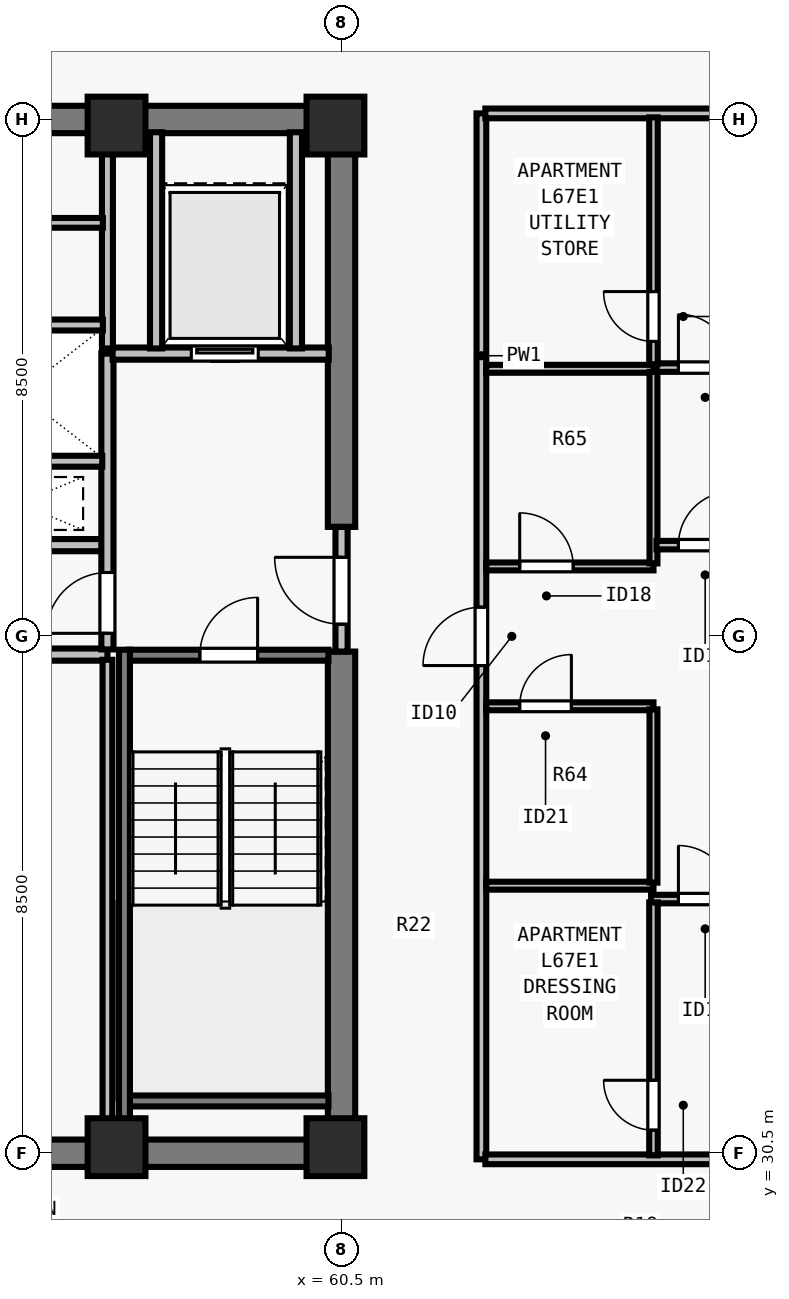
"""IFC4 building model, lengths in metres.
Left out: names, types, materials, properties, quantities, classifications, styles, units other than length and angle.
Written with IfcOpenShell. Run it as: python <this file> out.ifc"""

import sys

from ifc_helpers import new_model, si_unit, direction, frame, frame_2d, origin, origin_2d, place, context, subcontext, project, spatial, rectangle, extrude, element, fill, save


model = new_model("IFC4")
c1 = context("Model", 3, precision=1e-05, world=origin(), true_north=direction((0.0, 1.0)))
c2 = subcontext(c1, "Body", "Model", "MODEL_VIEW")
j1 = project(units=[si_unit("LENGTHUNIT", "METRE"), si_unit("PLANEANGLEUNIT", "RADIAN")], contexts=[c1])
p1 = place(None, origin())
s1 = spatial("IfcSite", under=j1, at=p1, CompositionType="ELEMENT")
p2 = place(p1, origin())
s2 = spatial("IfcBuilding", under=s1, at=p2, CompositionType="ELEMENT")
p3 = place(p2, frame((0.0, 0.0, 244.5)))
s3 = spatial("IfcBuildingStorey", under=s2, at=p3, CompositionType="ELEMENT", Elevation=244.5)
for number, where, z_axis, x_axis in (
    (1, (56.8, 30.6, 0.0), (0.0, 0.0, 1.0), (1.0, 0.0, 0.0)),
    (2, (60.4, 30.6, 0.0), (0.0, 0.0, 1.0), (1.0, 0.0, 0.0)),
    (3, (56.8, 47.4, 0.0), (0.0, 0.0, 1.0), (1.0, 0.0, 0.0)),
    (4, (60.4, 47.4, 0.0), (0.0, 0.0, 1.0), (1.0, 0.0, 0.0)),
):
    element("IfcColumn", number, at=place(p3, frame(where, z_axis=z_axis, x_axis=x_axis)), inside=s3, PredefinedType="COLUMN", context=c2, shape_type="SweptSolid", body=[
        extrude(rectangle(XDim=0.95, YDim=0.95, at=origin_2d()), origin(), (0.0, 0.0, 1.0), 3.5),
    ])
for number, where, z_axis, x_axis in (
    (5, (43.275, 30.5, 0.0), (0.0, 0.0, 1.0), (1.0, 0.0, 0.0)),
    (6, (43.275, 47.5, 0.0), (0.0, 0.0, 1.0), (1.0, 0.0, 0.0)),
):
    element("IfcWall", number, at=place(p3, frame(where, z_axis=z_axis, x_axis=x_axis)), inside=s3, PredefinedType="SHEAR", context=c2, shape_type="SweptSolid", body=[
        extrude(rectangle(XDim=17.45, YDim=0.45, at=frame_2d((8.725, 0.0))), origin(), (0.0, 0.0, 1.0), 3.29),
    ])
p4 = place(p3, frame((60.5, 30.715, 0.0), z_axis=(0.0, 0.0, 1.0), x_axis=(0.0, 1.0, 0.0)))
e7 = element("IfcWall", 7, at=p4, inside=s3, PredefinedType="SHEAR", context=c2, shape_type="SweptSolid", body=[
    extrude(rectangle(XDim=8.035, YDim=0.45, at=frame_2d((4.018, 0.0))), origin(), (0.0, 0.0, 1.0), 3.29),
])
p5 = place(p3, frame((60.5, 40.8, 0.0), z_axis=(0.0, 0.0, 1.0), x_axis=(0.0, 1.0, 0.0)))
e8 = element("IfcWall", 8, at=p5, inside=s3, PredefinedType="SHEAR", context=c2, shape_type="SweptSolid", body=[
    extrude(rectangle(XDim=6.485, YDim=0.45, at=frame_2d((3.242, 0.0))), origin(), (0.0, 0.0, 1.0), 3.29),
])
for number, where, z_axis, x_axis in (
    (9, (53.7, 38.7, 0.0), (0.0, 0.0, 1.0), (1.0, 0.0, 0.0)),
    (10, (53.7, 40.5, 0.0), (0.0, 0.0, 1.0), (1.0, 0.0, 0.0)),
):
    element("IfcWall", number, at=place(p3, frame(where, z_axis=z_axis, x_axis=x_axis)), inside=s3, PredefinedType="SOLIDWALL", context=c2, shape_type="SweptSolid", body=[
        extrude(rectangle(XDim=2.95, YDim=0.2, at=frame_2d((1.475, 0.0))), origin(), (0.0, 0.0, 1.0), 3.29),
    ])
p6 = place(p3, frame((60.5, 38.75, 0.0), z_axis=(0.0, 0.0, 1.0), x_axis=(0.0, 1.0, 0.0)))
e11 = element("IfcWall", 11, at=p6, inside=s3, PredefinedType="SOLIDWALL", context=c2, shape_type="SweptSolid", body=[
    extrude(rectangle(XDim=2.05, YDim=0.2, at=frame_2d((1.025, 0.0))), origin(), (0.0, 0.0, 1.0), 3.29),
])
p7 = place(p6, frame((0.45, 0.0, 0.0)))
e12 = element("IfcOpeningElement", 12, at=p7, cuts=e11, PredefinedType="OPENING", context=c2, shape_type="SweptSolid", body=[
    extrude(rectangle(XDim=1.1, YDim=2.15, at=frame_2d((0.55, 1.075))), frame((0.0, 0.11, 0.0), z_axis=(0.0, -1.0, 0.0), x_axis=(1.0, 0.0, 0.0)), (0.0, 0.0, 1.0), 0.22),
])
p8 = place(p3, frame((56.65, 38.785, 0.0), z_axis=(0.0, 0.0, 1.0), x_axis=(0.0, 1.0, 0.0)))
e13 = element("IfcWall", 13, at=p8, inside=s3, PredefinedType="SOLIDWALL", context=c2, shape_type="SweptSolid", body=[
    extrude(rectangle(XDim=4.865, YDim=0.2, at=frame_2d((2.433, 0.0))), origin(), (0.0, 0.0, 1.0), 3.29),
])
p9 = place(p8, frame((0.265, 0.0, 0.0)))
e14 = element("IfcOpeningElement", 14, at=p9, cuts=e13, PredefinedType="OPENING", context=c2, shape_type="SweptSolid", body=[
    extrude(rectangle(XDim=1.0, YDim=2.15, at=frame_2d((0.5, 1.075))), frame((0.0, 0.11, 0.0), z_axis=(0.0, -1.0, 0.0), x_axis=(1.0, 0.0, 0.0)), (0.0, 0.0, 1.0), 0.22),
])
p10 = place(p3, frame((56.735, 43.65, 0.0), z_axis=(0.0, 0.0, 1.0), x_axis=(1.0, 0.0, 0.0)))
e15 = element("IfcWall", 15, at=p10, inside=s3, PredefinedType="SOLIDWALL", context=c2, shape_type="SweptSolid", body=[
    extrude(rectangle(XDim=3.555, YDim=0.2, at=frame_2d((1.777, 0.0))), origin(), (0.0, 0.0, 1.0), 3.29),
])
p11 = place(p10, frame((1.295, 0.0, 0.0)))
e16 = element("IfcOpeningElement", 16, at=p11, cuts=e15, PredefinedType="OPENING", context=c2, shape_type="SweptSolid", body=[
    extrude(rectangle(XDim=1.1, YDim=2.2, at=frame_2d((0.55, 1.1))), frame((0.0, 0.11, 0.0), z_axis=(0.0, -1.0, 0.0), x_axis=(1.0, 0.0, 0.0)), (0.0, 0.0, 1.0), 0.22),
])
for number, where, z_axis, x_axis in (
    (17, (57.45, 43.735, 0.0), (0.0, 0.0, 1.0), (0.0, 1.0, 0.0)),
    (18, (59.75, 43.735, 0.0), (0.0, 0.0, 1.0), (0.0, 1.0, 0.0)),
):
    element("IfcWall", number, at=place(p3, frame(where, z_axis=z_axis, x_axis=x_axis)), inside=s3, PredefinedType="SOLIDWALL", context=c2, shape_type="SweptSolid", body=[
        extrude(rectangle(XDim=3.555, YDim=0.2, at=frame_2d((1.777, 0.0))), origin(), (0.0, 0.0, 1.0), 3.29),
    ])
p12 = place(p3, frame((56.65, 30.71, 0.0), z_axis=(0.0, 0.0, 1.0), x_axis=(0.0, 1.0, 0.0)))
e19 = element("IfcWall", 19, at=p12, inside=s3, PredefinedType="PARTITIONING", context=c2, shape_type="SweptSolid", body=[
    extrude(rectangle(XDim=7.905, YDim=0.16, at=frame_2d((3.953, 0.0))), origin(), (0.0, 0.0, 1.0), 3.29),
])
p13 = place(p3, frame((56.65, 43.735, 0.0), z_axis=(0.0, 0.0, 1.0), x_axis=(0.0, 1.0, 0.0)))
e20 = element("IfcWall", 20, at=p13, inside=s3, PredefinedType="SOLIDWALL", context=c2, shape_type="SweptSolid", body=[
    extrude(rectangle(XDim=3.555, YDim=0.18, at=frame_2d((1.777, 0.0))), origin(), (0.0, 0.0, 1.0), 3.29),
])
p14 = place(p3, frame((53.785, 41.88, 0.0), z_axis=(0.0, 0.0, 1.0), x_axis=(1.0, 0.0, 0.0)))
e21 = element("IfcWall", 21, at=p14, inside=s3, PredefinedType="SOLIDWALL", context=c2, shape_type="SweptSolid", body=[
    extrude(rectangle(XDim=2.78, YDim=0.18, at=frame_2d((1.39, 0.0))), origin(), (0.0, 0.0, 1.0), 3.29),
])
p15 = place(p3, frame((53.785, 44.12, 0.0), z_axis=(0.0, 0.0, 1.0), x_axis=(1.0, 0.0, 0.0)))
e22 = element("IfcWall", 22, at=p15, inside=s3, PredefinedType="SOLIDWALL", context=c2, shape_type="SweptSolid", body=[
    extrude(rectangle(XDim=2.79, YDim=0.18, at=frame_2d((1.395, 0.0))), origin(), (0.0, 0.0, 1.0), 3.29),
])
p16 = place(p3, frame((53.785, 45.8, 0.0), z_axis=(0.0, 0.0, 1.0), x_axis=(1.0, 0.0, 0.0)))
e23 = element("IfcWall", 23, at=p16, inside=s3, PredefinedType="PARTITIONING", context=c2, shape_type="SweptSolid", body=[
    extrude(rectangle(XDim=2.79, YDim=0.16, at=frame_2d((1.395, 0.0))), origin(), (0.0, 0.0, 1.0), 3.29),
])
p17 = place(p3, frame((62.8, 30.4, 0.0), z_axis=(0.0, 0.0, 1.0), x_axis=(0.0, 1.0, 0.0)))
e24 = element("IfcWall", 24, at=p17, inside=s3, PredefinedType="PARTITIONING", context=c2, shape_type="SweptSolid", body=[
    extrude(rectangle(XDim=17.2, YDim=0.16, at=frame_2d((8.6, 0.0))), origin(), (0.0, 0.0, 1.0), 3.29),
])
p18 = place(p17, frame((8.12, 0.0, 0.0)))
e25 = element("IfcOpeningElement", 25, at=p18, cuts=e24, PredefinedType="OPENING", context=c2, shape_type="SweptSolid", body=[
    extrude(rectangle(XDim=0.96, YDim=2.18, at=frame_2d((0.48, 1.09))), frame((0.0, 0.09, 0.0), z_axis=(0.0, -1.0, 0.0), x_axis=(1.0, 0.0, 0.0)), (0.0, 0.0, 1.0), 0.18),
])
for number, where, z_axis, x_axis in (
    (26, (62.865, 30.4, 0.0), (0.0, 0.0, 1.0), (1.0, 0.0, 0.0)),
    (27, (62.865, 47.6, 0.0), (0.0, 0.0, 1.0), (1.0, 0.0, 0.0)),
):
    element("IfcWall", number, at=place(p3, frame(where, z_axis=z_axis, x_axis=x_axis)), inside=s3, PredefinedType="PARTITIONING", context=c2, shape_type="SweptSolid", body=[
        extrude(rectangle(XDim=11.33, YDim=0.16, at=frame_2d((5.665, 0.0))), origin(), (0.0, 0.0, 1.0), 3.29),
    ])
p19 = place(p3, frame((62.88, 34.9, 0.0), z_axis=(0.0, 0.0, 1.0), x_axis=(1.0, 0.0, 0.0)))
e28 = element("IfcWall", 28, at=p19, inside=s3, PredefinedType="PLUMBINGWALL", context=c2, shape_type="SweptSolid", body=[
    extrude(rectangle(XDim=2.75, YDim=0.13, at=frame_2d((1.375, 0.0))), origin(), (0.0, 0.0, 1.0), 3.29),
])
p20 = place(p3, frame((62.88, 37.85, 0.0), z_axis=(0.0, 0.0, 1.0), x_axis=(1.0, 0.0, 0.0)))
e29 = element("IfcWall", 29, at=p20, inside=s3, PredefinedType="PLUMBINGWALL", context=c2, shape_type="SweptSolid", body=[
    extrude(rectangle(XDim=2.75, YDim=0.13, at=frame_2d((1.375, 0.0))), origin(), (0.0, 0.0, 1.0), 3.29),
])
p21 = place(p20, frame((0.55, 0.0, 0.0)))
e30 = element("IfcOpeningElement", 30, at=p21, cuts=e29, PredefinedType="OPENING", context=c2, shape_type="SweptSolid", body=[
    extrude(rectangle(XDim=0.85, YDim=2.08, at=frame_2d((0.425, 1.04))), frame((0.0, 0.075, 0.0), z_axis=(0.0, -1.0, 0.0), x_axis=(1.0, 0.0, 0.0)), (0.0, 0.0, 1.0), 0.15),
])
p22 = place(p3, frame((65.63, 34.95, 0.0), z_axis=(0.0, 0.0, 1.0), x_axis=(0.0, 1.0, 0.0)))
e31 = element("IfcWall", 31, at=p22, inside=s3, PredefinedType="PLUMBINGWALL", context=c2, shape_type="SweptSolid", body=[
    extrude(rectangle(XDim=2.85, YDim=0.13, at=frame_2d((1.425, 0.0))), origin(), (0.0, 0.0, 1.0), 3.29),
])
p23 = place(p3, frame((62.88, 43.4, 0.0), z_axis=(0.0, 0.0, 1.0), x_axis=(1.0, 0.0, 0.0)))
e32 = element("IfcWall", 32, at=p23, inside=s3, PredefinedType="PLUMBINGWALL", context=c2, shape_type="SweptSolid", body=[
    extrude(rectangle(XDim=2.75, YDim=0.13, at=frame_2d((1.375, 0.0))), origin(), (0.0, 0.0, 1.0), 3.29),
])
p24 = place(p3, frame((62.88, 40.15, 0.0), z_axis=(0.0, 0.0, 1.0), x_axis=(1.0, 0.0, 0.0)))
e33 = element("IfcWall", 33, at=p24, inside=s3, PredefinedType="PLUMBINGWALL", context=c2, shape_type="SweptSolid", body=[
    extrude(rectangle(XDim=2.75, YDim=0.13, at=frame_2d((1.375, 0.0))), origin(), (0.0, 0.0, 1.0), 3.29),
])
p25 = place(p24, frame((0.55, 0.0, 0.0)))
e34 = element("IfcOpeningElement", 34, at=p25, cuts=e33, PredefinedType="OPENING", context=c2, shape_type="SweptSolid", body=[
    extrude(rectangle(XDim=0.88, YDim=2.1, at=frame_2d((0.44, 1.05))), frame((0.0, 0.075, 0.0), z_axis=(0.0, -1.0, 0.0), x_axis=(1.0, 0.0, 0.0)), (0.0, 0.0, 1.0), 0.15),
])
p26 = place(p3, frame((65.63, 40.2, 0.0), z_axis=(0.0, 0.0, 1.0), x_axis=(0.0, 1.0, 0.0)))
e35 = element("IfcWall", 35, at=p26, inside=s3, PredefinedType="PLUMBINGWALL", context=c2, shape_type="SweptSolid", body=[
    extrude(rectangle(XDim=3.15, YDim=0.13, at=frame_2d((1.575, 0.0))), origin(), (0.0, 0.0, 1.0), 3.29),
])
p27 = place(p3, frame((65.59, 34.68, 0.0), z_axis=(0.0, 0.0, 1.0), x_axis=(1.0, 0.0, 0.0)))
e36 = element("IfcWall", 36, at=p27, inside=s3, PredefinedType="PARTITIONING", context=c2, shape_type="SweptSolid", body=[
    extrude(rectangle(XDim=8.53, YDim=0.14, at=frame_2d((4.265, 0.0))), origin(), (0.0, 0.0, 1.0), 3.29),
])
p28 = place(p27, frame((0.45, 0.0, 0.0)))
e37 = element("IfcOpeningElement", 37, at=p28, cuts=e36, PredefinedType="OPENING", context=c2, shape_type="SweptSolid", body=[
    extrude(rectangle(XDim=0.88, YDim=2.1, at=frame_2d((0.44, 1.05))), frame((0.0, 0.08, 0.0), z_axis=(0.0, -1.0, 0.0), x_axis=(1.0, 0.0, 0.0)), (0.0, 0.0, 1.0), 0.16),
])
p29 = place(p3, frame((65.63, 30.465, 0.0), z_axis=(0.0, 0.0, 1.0), x_axis=(0.0, 1.0, 0.0)))
e38 = element("IfcWall", 38, at=p29, inside=s3, PredefinedType="PARTITIONING", context=c2, shape_type="SweptSolid", body=[
    extrude(rectangle(XDim=4.16, YDim=0.14, at=frame_2d((2.08, 0.0))), origin(), (0.0, 0.0, 1.0), 3.29),
])
p30 = place(p29, frame((0.415, 0.0, 0.0)))
e39 = element("IfcOpeningElement", 39, at=p30, cuts=e38, PredefinedType="OPENING", context=c2, shape_type="SweptSolid", body=[
    extrude(rectangle(XDim=0.82, YDim=2.1, at=frame_2d((0.41, 1.05))), frame((0.0, 0.08, 0.0), z_axis=(0.0, -1.0, 0.0), x_axis=(1.0, 0.0, 0.0)), (0.0, 0.0, 1.0), 0.16),
])
p31 = place(p3, frame((65.68, 43.42, 0.0), z_axis=(0.0, 0.0, 1.0), x_axis=(1.0, 0.0, 0.0)))
e40 = element("IfcWall", 40, at=p31, inside=s3, PredefinedType="PARTITIONING", context=c2, shape_type="SweptSolid", body=[
    extrude(rectangle(XDim=8.44, YDim=0.14, at=frame_2d((4.22, 0.0))), origin(), (0.0, 0.0, 1.0), 3.29),
])
p32 = place(p31, frame((0.36, 0.0, 0.0)))
e41 = element("IfcOpeningElement", 41, at=p32, cuts=e40, PredefinedType="OPENING", context=c2, shape_type="SweptSolid", body=[
    extrude(rectangle(XDim=0.88, YDim=2.1, at=frame_2d((0.44, 1.05))), frame((0.0, 0.08, 0.0), z_axis=(0.0, -1.0, 0.0), x_axis=(1.0, 0.0, 0.0)), (0.0, 0.0, 1.0), 0.16),
])
p33 = place(p3, frame((65.63, 43.475, 0.0), z_axis=(0.0, 0.0, 1.0), x_axis=(0.0, 1.0, 0.0)))
e42 = element("IfcWall", 42, at=p33, inside=s3, PredefinedType="PARTITIONING", context=c2, shape_type="SweptSolid", body=[
    extrude(rectangle(XDim=4.06, YDim=0.14, at=frame_2d((2.03, 0.0))), origin(), (0.0, 0.0, 1.0), 3.29),
])
p34 = place(p33, frame((0.375, 0.0, 0.0)))
e43 = element("IfcOpeningElement", 43, at=p34, cuts=e42, PredefinedType="OPENING", context=c2, shape_type="SweptSolid", body=[
    extrude(rectangle(XDim=0.82, YDim=2.1, at=frame_2d((0.41, 1.05))), frame((0.0, 0.08, 0.0), z_axis=(0.0, -1.0, 0.0), x_axis=(1.0, 0.0, 0.0)), (0.0, 0.0, 1.0), 0.16),
])
p35 = place(p3, frame((65.68, 40.5, 0.0), z_axis=(0.0, 0.0, 1.0), x_axis=(1.0, 0.0, 0.0)))
e44 = element("IfcWall", 44, at=p35, inside=s3, PredefinedType="PARTITIONING", context=c2, shape_type="SweptSolid", body=[
    extrude(rectangle(XDim=8.44, YDim=0.14, at=frame_2d((4.22, 0.0))), origin(), (0.0, 0.0, 1.0), 3.29),
])
p36 = place(p35, frame((0.36, 0.0, 0.0)))
e45 = element("IfcOpeningElement", 45, at=p36, cuts=e44, PredefinedType="OPENING", context=c2, shape_type="SweptSolid", body=[
    extrude(rectangle(XDim=0.88, YDim=2.1, at=frame_2d((0.44, 1.05))), frame((0.0, 0.08, 0.0), z_axis=(0.0, -1.0, 0.0), x_axis=(1.0, 0.0, 0.0)), (0.0, 0.0, 1.0), 0.16),
])
p37 = place(p3, frame((57.005, 38.69, 0.0), z_axis=(0.0, 0.0, 1.0), x_axis=(1.0, 0.0, 0.0)))
e46 = element("IfcWall", 46, at=p37, inside=s3, PredefinedType="SOLIDWALL", context=c2, shape_type="SweptSolid", body=[
    extrude(rectangle(XDim=3.28, YDim=0.18, at=frame_2d((1.64, 0.0))), origin(), (0.0, 0.0, 1.0), 3.29),
])
p38 = place(p37, frame((1.165, 0.0, 0.0)))
e47 = element("IfcOpeningElement", 47, at=p38, cuts=e46, PredefinedType="OPENING", context=c2, shape_type="SweptSolid", body=[
    extrude(rectangle(XDim=0.95, YDim=2.15, at=frame_2d((0.475, 1.075))), frame((0.0, 0.1, 0.0), z_axis=(0.0, -1.0, 0.0), x_axis=(1.0, 0.0, 0.0)), (0.0, 0.0, 1.0), 0.2),
])
p39 = place(p3, frame((57.005, 31.36, 0.0), z_axis=(0.0, 0.0, 1.0), x_axis=(1.0, 0.0, 0.0)))
e48 = element("IfcWall", 48, at=p39, inside=s3, PredefinedType="SOLIDWALL", context=c2, shape_type="SweptSolid", body=[
    extrude(rectangle(XDim=3.28, YDim=0.18, at=frame_2d((1.64, 0.0))), origin(), (0.0, 0.0, 1.0), 3.29),
])
p40 = place(p3, frame((56.93, 38.78, 0.0), z_axis=(0.0, 0.0, 1.0), x_axis=(0.0, -1.0, 0.0)))
e49 = element("IfcWall", 49, at=p40, inside=s3, PredefinedType="SOLIDWALL", context=c2, shape_type="SweptSolid", body=[
    extrude(rectangle(XDim=8.067, YDim=0.18, at=frame_2d((4.034, 0.0))), origin(), (0.0, 0.0, 1.0), 3.29),
])
p41 = place(p7, origin())
e50 = element("IfcDoor", 50, at=p41, inside=s3, OperationType="SINGLE_SWING_RIGHT", PredefinedType="DOOR", context=c2, shape_type="SweptSolid", body=[
    extrude(rectangle(XDim=1.1, YDim=2.15, at=frame_2d((0.55, 1.075))), frame((0.0, 0.025, 0.0), z_axis=(0.0, -1.0, 0.0), x_axis=(1.0, 0.0, 0.0)), (0.0, 0.0, 1.0), 0.05),
])
fill(e12, e50)
p42 = place(p9, origin())
e51 = element("IfcDoor", 51, at=p42, inside=s3, OperationType="SINGLE_SWING_LEFT", PredefinedType="DOOR", context=c2, shape_type="SweptSolid", body=[
    extrude(rectangle(XDim=1.0, YDim=2.15, at=frame_2d((0.5, 1.075))), frame((0.0, 0.025, 0.0), z_axis=(0.0, -1.0, 0.0), x_axis=(1.0, 0.0, 0.0)), (0.0, 0.0, 1.0), 0.05),
])
fill(e14, e51)
p43 = place(p11, origin())
e52 = element("IfcDoor", 52, at=p43, inside=s3, OperationType="SLIDING_TO_LEFT", PredefinedType="DOOR", context=c2, shape_type="SweptSolid", body=[
    extrude(rectangle(XDim=1.1, YDim=2.2, at=frame_2d((0.55, 1.1))), frame((0.0, 0.025, 0.0), z_axis=(0.0, -1.0, 0.0), x_axis=(1.0, 0.0, 0.0)), (0.0, 0.0, 1.0), 0.05),
])
fill(e16, e52)
p44 = place(p21, origin())
e53 = element("IfcDoor", 53, at=p44, inside=s3, OperationType="SINGLE_SWING_RIGHT", PredefinedType="DOOR", context=c2, shape_type="SweptSolid", body=[
    extrude(rectangle(XDim=0.85, YDim=2.08, at=frame_2d((0.425, 1.04))), frame((0.0, 0.025, 0.0), z_axis=(0.0, -1.0, 0.0), x_axis=(1.0, 0.0, 0.0)), (0.0, 0.0, 1.0), 0.05),
])
fill(e30, e53)
p45 = place(p25, origin())
e54 = element("IfcDoor", 54, at=p45, inside=s3, OperationType="SINGLE_SWING_LEFT", PredefinedType="DOOR", context=c2, shape_type="SweptSolid", body=[
    extrude(rectangle(XDim=0.88, YDim=2.1, at=frame_2d((0.44, 1.05))), frame((0.0, 0.025, 0.0), z_axis=(0.0, -1.0, 0.0), x_axis=(1.0, 0.0, 0.0)), (0.0, 0.0, 1.0), 0.05),
])
fill(e34, e54)
p46 = place(p30, origin())
e55 = element("IfcDoor", 55, at=p46, inside=s3, OperationType="SINGLE_SWING_RIGHT", PredefinedType="DOOR", context=c2, shape_type="SweptSolid", body=[
    extrude(rectangle(XDim=0.82, YDim=2.1, at=frame_2d((0.41, 1.05))), frame((0.0, 0.025, 0.0), z_axis=(0.0, -1.0, 0.0), x_axis=(1.0, 0.0, 0.0)), (0.0, 0.0, 1.0), 0.05),
])
fill(e39, e55)
p47 = place(p28, origin())
e56 = element("IfcDoor", 56, at=p47, inside=s3, OperationType="SINGLE_SWING_LEFT", PredefinedType="DOOR", context=c2, shape_type="SweptSolid", body=[
    extrude(rectangle(XDim=0.88, YDim=2.1, at=frame_2d((0.44, 1.05))), frame((0.0, 0.025, 0.0), z_axis=(0.0, -1.0, 0.0), x_axis=(1.0, 0.0, 0.0)), (0.0, 0.0, 1.0), 0.05),
])
fill(e37, e56)
p48 = place(p34, origin())
e57 = element("IfcDoor", 57, at=p48, inside=s3, OperationType="SINGLE_SWING_RIGHT", PredefinedType="DOOR", context=c2, shape_type="SweptSolid", body=[
    extrude(rectangle(XDim=0.82, YDim=2.1, at=frame_2d((0.41, 1.05))), frame((0.0, 0.025, 0.0), z_axis=(0.0, -1.0, 0.0), x_axis=(1.0, 0.0, 0.0)), (0.0, 0.0, 1.0), 0.05),
])
fill(e43, e57)
p49 = place(p32, origin())
e58 = element("IfcDoor", 58, at=p49, inside=s3, OperationType="SINGLE_SWING_LEFT", PredefinedType="DOOR", context=c2, shape_type="SweptSolid", body=[
    extrude(rectangle(XDim=0.88, YDim=2.1, at=frame_2d((0.44, 1.05))), frame((0.0, 0.025, 0.0), z_axis=(0.0, -1.0, 0.0), x_axis=(1.0, 0.0, 0.0)), (0.0, 0.0, 1.0), 0.05),
])
fill(e41, e58)
p50 = place(p36, origin())
e59 = element("IfcDoor", 59, at=p50, inside=s3, OperationType="SINGLE_SWING_RIGHT", PredefinedType="DOOR", context=c2, shape_type="SweptSolid", body=[
    extrude(rectangle(XDim=0.88, YDim=2.1, at=frame_2d((0.44, 1.05))), frame((0.0, 0.025, 0.0), z_axis=(0.0, -1.0, 0.0), x_axis=(1.0, 0.0, 0.0)), (0.0, 0.0, 1.0), 0.05),
])
fill(e45, e59)
p51 = place(p18, origin())
e60 = element("IfcDoor", 60, at=p51, inside=s3, OperationType="SINGLE_SWING_LEFT", PredefinedType="DOOR", context=c2, shape_type="SweptSolid", body=[
    extrude(rectangle(XDim=0.96, YDim=2.18, at=frame_2d((0.48, 1.09))), frame((0.0, 0.025, 0.0), z_axis=(0.0, -1.0, 0.0), x_axis=(1.0, 0.0, 0.0)), (0.0, 0.0, 1.0), 0.05),
])
fill(e25, e60)
p52 = place(p38, origin())
e61 = element("IfcDoor", 61, at=p52, inside=s3, OperationType="SINGLE_SWING_RIGHT", PredefinedType="DOOR", context=c2, shape_type="SweptSolid", body=[
    extrude(rectangle(XDim=0.95, YDim=2.15, at=frame_2d((0.475, 1.075))), frame((0.0, 0.025, 0.0), z_axis=(0.0, -1.0, 0.0), x_axis=(1.0, 0.0, 0.0)), (0.0, 0.0, 1.0), 0.05),
])
fill(e47, e61)
save(model, sys.argv[1])
